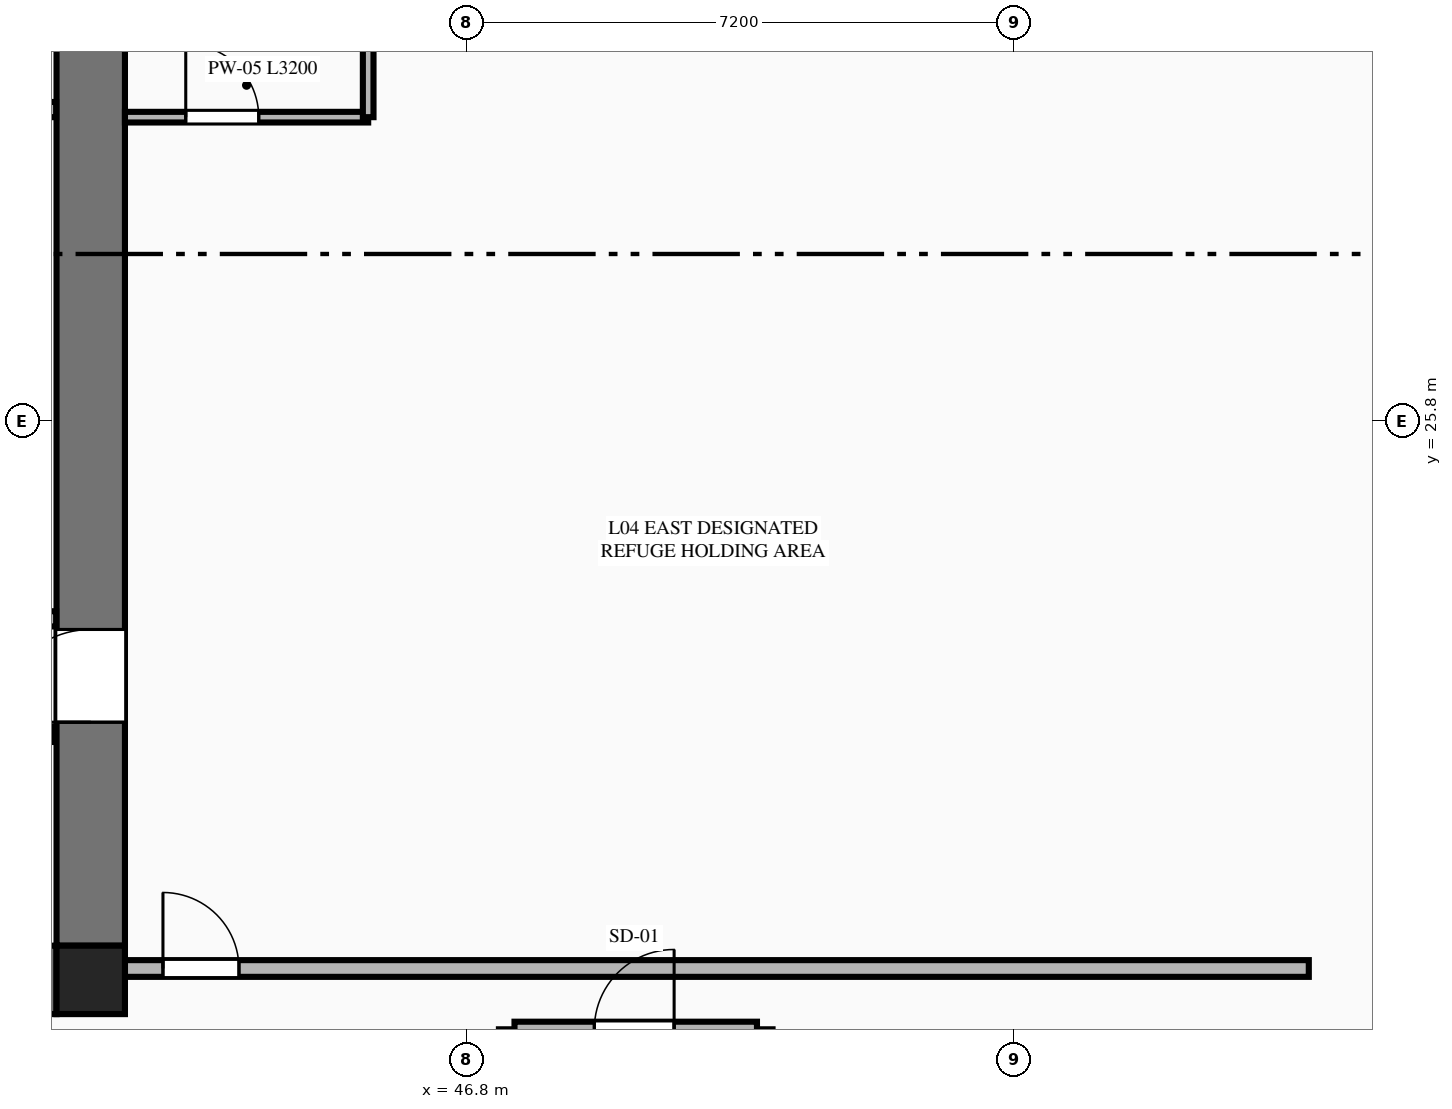
"""IFC4 building model, lengths in metres.
Left out: names, types, materials, properties, quantities, classifications, styles, units other than length and angle.
Written with IfcOpenShell. Run it as: python <this file> out.ifc"""

import sys

from ifc_helpers import new_model, si_unit, direction, frame, frame_2d, origin, origin_2d, place, context, subcontext, project, spatial, rectangle, extrude, element, fill, save


model = new_model("IFC4")
c1 = context("Model", 3, precision=1e-05, world=origin(), true_north=direction((0.0, 1.0)))
c2 = subcontext(c1, "Body", "Model", "MODEL_VIEW")
j1 = project(units=[si_unit("LENGTHUNIT", "METRE"), si_unit("PLANEANGLEUNIT", "RADIAN")], contexts=[c1])
p1 = place(None, origin())
s1 = spatial("IfcSite", under=j1, at=p1, CompositionType="ELEMENT")
p2 = place(p1, origin())
s2 = spatial("IfcBuilding", under=s1, at=p2, CompositionType="ELEMENT")
p3 = place(p2, frame((0.0, 0.0, 19.5)))
s3 = spatial("IfcBuildingStorey", under=s2, at=p3, CompositionType="ELEMENT", Elevation=19.5)
p4 = place(p3, frame((41.85, 18.45, 0.0), z_axis=(0.0, 0.0, 1.0), x_axis=(1.0, 0.0, 0.0)))
e1 = element("IfcColumn", 1, at=p4, inside=s3, PredefinedType="COLUMN", context=c2, shape_type="SweptSolid", body=[
    extrude(rectangle(XDim=0.9, YDim=0.9, at=origin_2d()), origin(), (0.0, 0.0, 1.0), 5.4),
])
p5 = place(p3, frame((23.4, 18.45, 0.0), z_axis=(0.0, 0.0, 1.0), x_axis=(1.0, 0.0, 0.0)))
e2 = element("IfcWall", 2, at=p5, inside=s3, PredefinedType="SHEAR", context=c2, shape_type="SweptSolid", body=[
    extrude(rectangle(XDim=18.0, YDim=0.9, at=frame_2d((9.0, 0.0))), origin(), (0.0, 0.0, 1.0), 5.18),
])
p6 = place(p3, frame((41.85, 18.9, 0.0), z_axis=(0.0, 0.0, 1.0), x_axis=(0.0, 1.0, 0.0)))
e3 = element("IfcWall", 3, at=p6, inside=s3, PredefinedType="SHEAR", context=c2, shape_type="SweptSolid", body=[
    extrude(rectangle(XDim=14.0, YDim=0.9, at=frame_2d((7.0, 0.0))), origin(), (0.0, 0.0, 1.0), 5.18),
])
p7 = place(p6, frame((2.94, 0.0, 0.0)))
e4 = element("IfcOpeningElement", 4, at=p7, cuts=e3, PredefinedType="OPENING", context=c2, shape_type="SweptSolid", body=[
    extrude(rectangle(XDim=1.22, YDim=2.25, at=frame_2d((0.61, 1.125))), frame((0.0, 0.46, 0.0), z_axis=(0.0, -1.0, 0.0), x_axis=(1.0, 0.0, 0.0)), (0.0, 0.0, 1.0), 0.92),
])
p8 = place(p3, frame((38.125, 23.2, 0.0), z_axis=(0.0, 0.0, 1.0), x_axis=(1.0, 0.0, 0.0)))
e5 = element("IfcWall", 5, at=p8, inside=s3, PredefinedType="PLUMBINGWALL", context=c2, shape_type="SweptSolid", body=[
    extrude(rectangle(XDim=3.27, YDim=0.2, at=frame_2d((1.635, 0.0))), origin(), (0.0, 0.0, 1.0), 5.18),
])
p9 = place(p3, frame((38.125, 29.9, 0.0), z_axis=(0.0, 0.0, 1.0), x_axis=(1.0, 0.0, 0.0)))
e6 = element("IfcWall", 6, at=p9, inside=s3, PredefinedType="PLUMBINGWALL", context=c2, shape_type="SweptSolid", body=[
    extrude(rectangle(XDim=3.27, YDim=0.2, at=frame_2d((1.635, 0.0))), origin(), (0.0, 0.0, 1.0), 5.18),
])
p10 = place(p9, frame((0.5, 0.0, 0.0)))
e7 = element("IfcOpeningElement", 7, at=p10, cuts=e6, PredefinedType="OPENING", context=c2, shape_type="SweptSolid", body=[
    extrude(rectangle(XDim=0.85, YDim=2.05, at=frame_2d((0.425, 1.025))), frame((0.0, 0.11, 0.0), z_axis=(0.0, -1.0, 0.0), x_axis=(1.0, 0.0, 0.0)), (0.0, 0.0, 1.0), 0.22),
])
p11 = place(p3, frame((23.42, 21.68, 0.0), z_axis=(0.0, 0.0, 1.0), x_axis=(1.0, 0.0, 0.0)))
e8 = element("IfcWall", 8, at=p11, inside=s3, PredefinedType="PLUMBINGWALL", context=c2, shape_type="SweptSolid", body=[
    extrude(rectangle(XDim=17.96, YDim=0.2, at=frame_2d((8.98, 0.0))), origin(), (0.0, 0.0, 1.0), 5.18),
])
p12 = place(p11, frame((4.45, 0.0, 0.0)))
e9 = element("IfcOpeningElement", 9, at=p12, cuts=e8, PredefinedType="OPENING", context=c2, shape_type="SweptSolid", body=[
    extrude(rectangle(XDim=1.1, YDim=2.2, at=frame_2d((0.55, 1.1))), frame((0.0, 0.11, 0.0), z_axis=(0.0, -1.0, 0.0), x_axis=(1.0, 0.0, 0.0)), (0.0, 0.0, 1.0), 0.22),
])
p13 = place(p11, frame((6.85, 0.0, 0.0)))
e10 = element("IfcOpeningElement", 10, at=p13, cuts=e8, PredefinedType="OPENING", context=c2, shape_type="SweptSolid", body=[
    extrude(rectangle(XDim=1.1, YDim=2.2, at=frame_2d((0.55, 1.1))), frame((0.0, 0.11, 0.0), z_axis=(0.0, -1.0, 0.0), x_axis=(1.0, 0.0, 0.0)), (0.0, 0.0, 1.0), 0.22),
])
p14 = place(p11, frame((9.25, 0.0, 0.0)))
e11 = element("IfcOpeningElement", 11, at=p14, cuts=e8, PredefinedType="OPENING", context=c2, shape_type="SweptSolid", body=[
    extrude(rectangle(XDim=1.1, YDim=2.2, at=frame_2d((0.55, 1.1))), frame((0.0, 0.11, 0.0), z_axis=(0.0, -1.0, 0.0), x_axis=(1.0, 0.0, 0.0)), (0.0, 0.0, 1.0), 0.22),
])
p15 = place(p11, frame((0.25, 0.0, 0.0)))
e12 = element("IfcOpeningElement", 12, at=p15, cuts=e8, PredefinedType="OPENING", context=c2, shape_type="SweptSolid", body=[
    extrude(rectangle(XDim=0.85, YDim=2.05, at=frame_2d((0.425, 1.025))), frame((0.0, 0.11, 0.0), z_axis=(0.0, -1.0, 0.0), x_axis=(1.0, 0.0, 0.0)), (0.0, 0.0, 1.0), 0.22),
])
p16 = place(p11, frame((2.05, 0.0, 0.0)))
e13 = element("IfcOpeningElement", 13, at=p16, cuts=e8, PredefinedType="OPENING", context=c2, shape_type="SweptSolid", body=[
    extrude(rectangle(XDim=0.85, YDim=2.05, at=frame_2d((0.425, 1.025))), frame((0.0, 0.11, 0.0), z_axis=(0.0, -1.0, 0.0), x_axis=(1.0, 0.0, 0.0)), (0.0, 0.0, 1.0), 0.22),
])
p17 = place(p11, frame((14.6, 0.0, 0.0)))
e14 = element("IfcOpeningElement", 14, at=p17, cuts=e8, PredefinedType="OPENING", context=c2, shape_type="SweptSolid", body=[
    extrude(rectangle(XDim=0.85, YDim=2.05, at=frame_2d((0.425, 1.025))), frame((0.0, 0.11, 0.0), z_axis=(0.0, -1.0, 0.0), x_axis=(1.0, 0.0, 0.0)), (0.0, 0.0, 1.0), 0.22),
])
p18 = place(p3, frame((47.425, 17.8, 0.0), z_axis=(0.0, 0.0, 1.0), x_axis=(1.0, 0.0, 0.0)))
e15 = element("IfcWall", 15, at=p18, inside=s3, PredefinedType="PLUMBINGWALL", context=c2, shape_type="SweptSolid", body=[
    extrude(rectangle(XDim=3.19, YDim=0.2, at=frame_2d((1.595, 0.0))), origin(), (0.0, 0.0, 1.0), 3.79),
])
p19 = place(p18, frame((1.05, 0.0, 0.0)))
e16 = element("IfcOpeningElement", 16, at=p19, cuts=e15, PredefinedType="OPENING", context=c2, shape_type="SweptSolid", body=[
    extrude(rectangle(XDim=1.05, YDim=2.15, at=frame_2d((0.525, 1.075))), frame((0.0, 0.11, 0.0), z_axis=(0.0, -1.0, 0.0), x_axis=(1.0, 0.0, 0.0)), (0.0, 0.0, 1.0), 0.22),
])
p20 = place(p3, frame((42.3, 18.6, 0.0), z_axis=(0.0, 0.0, 1.0), x_axis=(1.0, 0.0, 0.0)))
e17 = element("IfcWall", 17, at=p20, inside=s3, PredefinedType="PARTITIONING", context=c2, shape_type="SweptSolid", body=[
    extrude(rectangle(XDim=15.575, YDim=0.22, at=frame_2d((7.788, 0.0))), origin(), (0.0, 0.0, 1.0), 3.79),
])
p21 = place(p20, frame((0.5, 0.0, 0.0)))
e18 = element("IfcOpeningElement", 18, at=p21, cuts=e17, PredefinedType="OPENING", context=c2, shape_type="SweptSolid", body=[
    extrude(rectangle(XDim=1.0, YDim=2.15, at=frame_2d((0.5, 1.075))), frame((0.0, 0.12, 0.0), z_axis=(0.0, -1.0, 0.0), x_axis=(1.0, 0.0, 0.0)), (0.0, 0.0, 1.0), 0.24),
])
p22 = place(p3, frame((42.3, 29.8, 0.0), z_axis=(0.0, 0.0, 1.0), x_axis=(1.0, 0.0, 0.0)))
e19 = element("IfcWall", 19, at=p22, inside=s3, PredefinedType="PLUMBINGWALL", context=c2, shape_type="SweptSolid", body=[
    extrude(rectangle(XDim=3.2, YDim=0.14, at=frame_2d((1.6, 0.0))), origin(), (0.0, 0.0, 1.0), 5.18),
])
p23 = place(p22, frame((0.8, 0.0, 0.0)))
e20 = element("IfcOpeningElement", 20, at=p23, cuts=e19, PredefinedType="OPENING", context=c2, shape_type="SweptSolid", body=[
    extrude(rectangle(XDim=0.96, YDim=2.15, at=frame_2d((0.48, 1.075))), frame((0.0, 0.08, 0.0), z_axis=(0.0, -1.0, 0.0), x_axis=(1.0, 0.0, 0.0)), (0.0, 0.0, 1.0), 0.16),
])
p24 = place(p3, frame((45.5, 29.8, 0.0), z_axis=(0.0, 0.0, 1.0), x_axis=(0.0, 1.0, 0.0)))
e21 = element("IfcWall", 21, at=p24, inside=s3, PredefinedType="PLUMBINGWALL", context=c2, shape_type="SweptSolid", body=[
    extrude(rectangle(XDim=3.4, YDim=0.14, at=frame_2d((1.7, 0.0))), origin(), (0.0, 0.0, 1.0), 5.18),
])
p25 = place(p3, frame((54.104, 7.352, 0.0), z_axis=(0.0, 0.0, 1.0), x_axis=(0.483641700598, 0.87526607694, 0.0)))
e22 = element("IfcWall", 22, at=p25, inside=s3, PredefinedType="STANDARD", context=c2, shape_type="SweptSolid", body=[
    extrude(rectangle(XDim=12.966, YDim=0.36, at=frame_2d((6.483, 0.0))), origin(), (0.0, 0.0, 1.0), 5.18),
])
p26 = place(p7, origin())
e23 = element("IfcDoor", 23, at=p26, inside=s3, OperationType="SINGLE_SWING_LEFT", PredefinedType="DOOR", context=c2, shape_type="SweptSolid", body=[
    extrude(rectangle(XDim=1.22, YDim=2.25, at=frame_2d((0.61, 1.125))), frame((0.0, 0.025, 0.0), z_axis=(0.0, -1.0, 0.0), x_axis=(1.0, 0.0, 0.0)), (0.0, 0.0, 1.0), 0.05),
])
fill(e4, e23)
p27 = place(p19, origin())
e24 = element("IfcDoor", 24, at=p27, inside=s3, OperationType="SINGLE_SWING_RIGHT", PredefinedType="DOOR", context=c2, shape_type="SweptSolid", body=[
    extrude(rectangle(XDim=1.05, YDim=2.15, at=frame_2d((0.525, 1.075))), frame((0.0, 0.025, 0.0), z_axis=(0.0, -1.0, 0.0), x_axis=(1.0, 0.0, 0.0)), (0.0, 0.0, 1.0), 0.05),
])
fill(e16, e24)
p28 = place(p23, origin())
e25 = element("IfcDoor", 25, at=p28, inside=s3, OperationType="SINGLE_SWING_LEFT", PredefinedType="DOOR", context=c2, shape_type="SweptSolid", body=[
    extrude(rectangle(XDim=0.96, YDim=2.15, at=frame_2d((0.48, 1.075))), frame((0.0, 0.025, 0.0), z_axis=(0.0, -1.0, 0.0), x_axis=(1.0, 0.0, 0.0)), (0.0, 0.0, 1.0), 0.05),
])
fill(e20, e25)
p29 = place(p21, origin())
e26 = element("IfcDoor", 26, at=p29, inside=s3, OperationType="SINGLE_SWING_LEFT", PredefinedType="DOOR", context=c2, shape_type="SweptSolid", body=[
    extrude(rectangle(XDim=1.0, YDim=2.15, at=frame_2d((0.5, 1.075))), frame((0.0, 0.025, 0.0), z_axis=(0.0, -1.0, 0.0), x_axis=(1.0, 0.0, 0.0)), (0.0, 0.0, 1.0), 0.05),
])
fill(e18, e26)
save(model, sys.argv[1])
